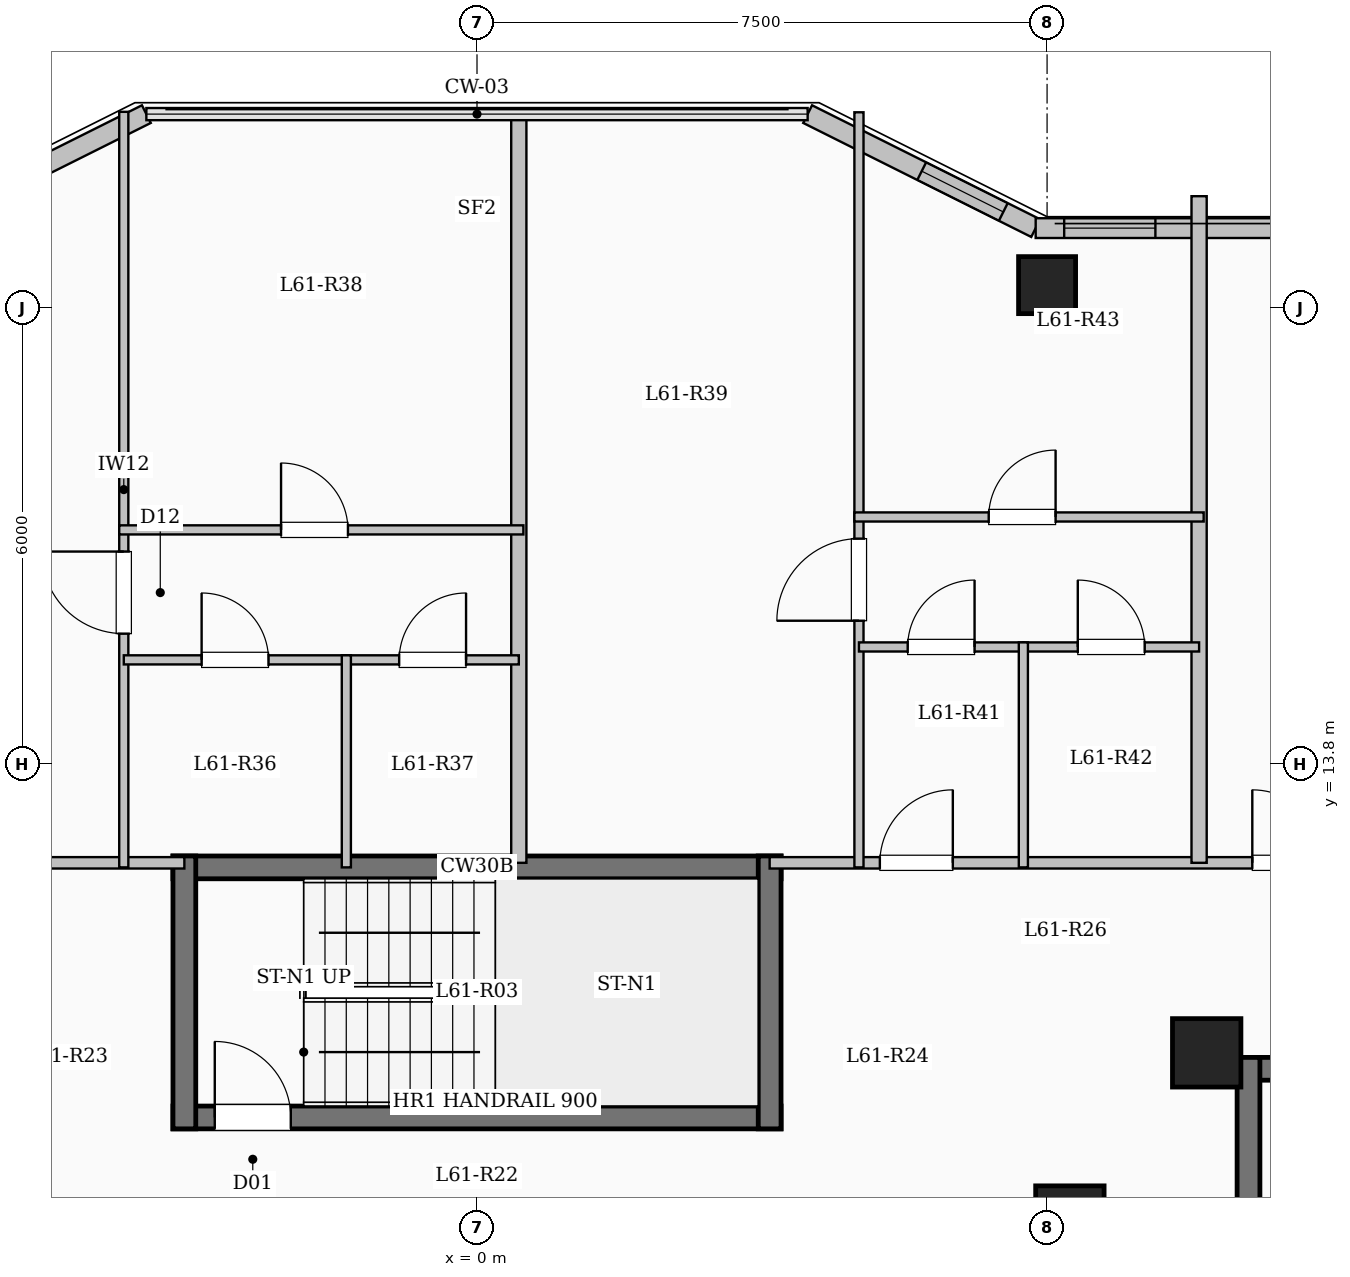
"""IFC4 building model, lengths in metres.
Left out: names, types, materials, properties, quantities, classifications, styles, units other than length and angle.
Written with IfcOpenShell. Run it as: python <this file> out.ifc"""

import sys

from ifc_helpers import new_model, si_unit, direction, frame, frame_2d, origin, origin_2d, place, context, subcontext, project, spatial, rectangle, extrude, element, fill, save


model = new_model("IFC4")
c1 = context("Model", 3, precision=1e-05, world=origin(), true_north=direction((0.0, 1.0)))
c2 = subcontext(c1, "Body", "Model", "MODEL_VIEW")
j1 = project(units=[si_unit("LENGTHUNIT", "METRE"), si_unit("PLANEANGLEUNIT", "RADIAN")], contexts=[c1])
p1 = place(None, origin())
s1 = spatial("IfcSite", under=j1, at=p1, CompositionType="ELEMENT")
p2 = place(p1, origin())
s2 = spatial("IfcBuilding", under=s1, at=p2, CompositionType="ELEMENT")
p3 = place(p2, frame((0.0, 0.0, 223.75)))
s3 = spatial("IfcBuildingStorey", under=s2, at=p3, CompositionType="ELEMENT", Elevation=223.75)
for number, where, z_axis, x_axis in (
    (1, (7.8, 7.8, 0.0), (0.0, 0.0, 1.0), (1.0, 0.0, 0.0)),
    (2, (9.6, 10.0, 0.0), (0.0, 0.0, 1.0), (1.0, 0.0, 0.0)),
):
    element("IfcColumn", number, at=place(p3, frame(where, z_axis=z_axis, x_axis=x_axis)), inside=s3, PredefinedType="COLUMN", context=c2, shape_type="SweptSolid", body=[
        extrude(rectangle(XDim=0.9, YDim=0.9, at=origin_2d()), origin(), (0.0, 0.0, 1.0), 3.35),
    ])
p4 = place(p3, frame((7.5, 20.1, 0.0), z_axis=(0.0, 0.0, 1.0), x_axis=(1.0, 0.0, 0.0)))
e3 = element("IfcColumn", 3, at=p4, inside=s3, PredefinedType="COLUMN", context=c2, shape_type="SweptSolid", body=[
    extrude(rectangle(XDim=0.75, YDim=0.75, at=origin_2d()), origin(), (0.0, 0.0, 1.0), 3.35),
])
p5 = place(p3, frame((-7.35, 20.85, 0.0), z_axis=(0.0, 0.0, 1.0), x_axis=(0.894427191, 0.4472135955, 0.0)))
e4 = element("IfcWall", 4, at=p5, inside=s3, PredefinedType="SOLIDWALL", context=c2, shape_type="SweptSolid", body=[
    extrude(rectangle(XDim=3.354, YDim=0.26, at=frame_2d((1.677, 0.0))), origin(), (0.0, 0.0, 1.0), 3.05),
])
p6 = place(p5, frame((0.501, 0.0, 0.95)))
e5 = element("IfcOpeningElement", 5, at=p6, cuts=e4, PredefinedType="OPENING", context=c2, shape_type="SweptSolid", body=[
    extrude(rectangle(XDim=1.2, YDim=1.5, at=frame_2d((0.6, 0.75))), frame((0.0, 0.14, 0.0), z_axis=(0.0, -1.0, 0.0), x_axis=(1.0, 0.0, 0.0)), (0.0, 0.0, 1.0), 0.28),
])
p7 = place(p3, frame((4.35, 22.35, 0.0), z_axis=(0.0, 0.0, 1.0), x_axis=(0.894427191, -0.4472135955, 0.0)))
e6 = element("IfcWall", 6, at=p7, inside=s3, PredefinedType="SOLIDWALL", context=c2, shape_type="SweptSolid", body=[
    extrude(rectangle(XDim=3.354, YDim=0.26, at=frame_2d((1.677, 0.0))), origin(), (0.0, 0.0, 1.0), 3.05),
])
p8 = place(p7, frame((1.678, 0.0, 0.95)))
e7 = element("IfcOpeningElement", 7, at=p8, cuts=e6, PredefinedType="OPENING", context=c2, shape_type="SweptSolid", body=[
    extrude(rectangle(XDim=1.2, YDim=1.5, at=frame_2d((0.6, 0.75))), frame((0.0, 0.14, 0.0), z_axis=(0.0, -1.0, 0.0), x_axis=(1.0, 0.0, 0.0)), (0.0, 0.0, 1.0), 0.28),
])
p9 = place(p3, frame((7.35, 20.85, 0.0), z_axis=(0.0, 0.0, 1.0), x_axis=(1.0, 0.0, 0.0)))
e8 = element("IfcWall", 8, at=p9, inside=s3, PredefinedType="SOLIDWALL", context=c2, shape_type="SweptSolid", body=[
    extrude(rectangle(XDim=11.1, YDim=0.26, at=frame_2d((5.55, 0.0))), origin(), (0.0, 0.0, 1.0), 3.05),
])
p10 = place(p9, frame((0.375, 0.0, 0.95)))
e9 = element("IfcOpeningElement", 9, at=p10, cuts=e8, PredefinedType="OPENING", context=c2, shape_type="SweptSolid", body=[
    extrude(rectangle(XDim=1.2, YDim=1.5, at=frame_2d((0.6, 0.75))), frame((0.0, 0.14, 0.0), z_axis=(0.0, -1.0, 0.0), x_axis=(1.0, 0.0, 0.0)), (0.0, 0.0, 1.0), 0.28),
])
p11 = place(p9, frame((3.245, 0.0, 0.9)))
e10 = element("IfcOpeningElement", 10, at=p11, cuts=e8, PredefinedType="OPENING", context=c2, shape_type="SweptSolid", body=[
    extrude(rectangle(XDim=2.2, YDim=1.75, at=frame_2d((1.1, 0.875))), frame((0.0, 0.14, 0.0), z_axis=(0.0, -1.0, 0.0), x_axis=(1.0, 0.0, 0.0)), (0.0, 0.0, 1.0), 0.28),
])
p12 = place(p9, frame((7.965, 0.0, 0.9)))
e11 = element("IfcOpeningElement", 11, at=p12, cuts=e8, PredefinedType="OPENING", context=c2, shape_type="SweptSolid", body=[
    extrude(rectangle(XDim=1.65, YDim=1.6, at=frame_2d((0.825, 0.8))), frame((0.0, 0.14, 0.0), z_axis=(0.0, -1.0, 0.0), x_axis=(1.0, 0.0, 0.0)), (0.0, 0.0, 1.0), 0.28),
])
p13 = place(p3, frame((10.0, 9.79, 0.0), z_axis=(0.0, 0.0, 1.0), x_axis=(1.0, 0.0, 0.0)))
e12 = element("IfcWall", 12, at=p13, inside=s3, PredefinedType="SHEAR", context=c2, shape_type="SweptSolid", body=[
    extrude(rectangle(XDim=8.0, YDim=0.3, at=frame_2d((4.0, 0.0))), origin(), (0.0, 0.0, 1.0), 3.35),
])
p14 = place(p3, frame((10.15, 6.35, 0.0), z_axis=(0.0, 0.0, 1.0), x_axis=(0.0, 1.0, 0.0)))
e13 = element("IfcWall", 13, at=p14, inside=s3, PredefinedType="SHEAR", context=c2, shape_type="SweptSolid", body=[
    extrude(rectangle(XDim=3.59, YDim=0.3, at=frame_2d((1.795, 0.0))), origin(), (0.0, 0.0, 1.0), 3.35),
])
p15 = place(p3, frame((-4.0, 12.44, 0.0), z_axis=(0.0, 0.0, 1.0), x_axis=(1.0, 0.0, 0.0)))
e14 = element("IfcWall", 14, at=p15, inside=s3, PredefinedType="SHEAR", context=c2, shape_type="SweptSolid", body=[
    extrude(rectangle(XDim=8.0, YDim=0.3, at=frame_2d((4.0, 0.0))), origin(), (0.0, 0.0, 1.0), 3.35),
])
p16 = place(p3, frame((-4.0, 9.15, 0.0), z_axis=(0.0, 0.0, 1.0), x_axis=(1.0, 0.0, 0.0)))
e15 = element("IfcWall", 15, at=p16, inside=s3, PredefinedType="SHEAR", context=c2, shape_type="SweptSolid", body=[
    extrude(rectangle(XDim=8.0, YDim=0.3, at=frame_2d((4.0, 0.0))), origin(), (0.0, 0.0, 1.0), 3.35),
])
p17 = place(p16, frame((0.55, 0.0, 0.0)))
e16 = element("IfcOpeningElement", 16, at=p17, cuts=e15, PredefinedType="OPENING", context=c2, shape_type="SweptSolid", body=[
    extrude(rectangle(XDim=1.0, YDim=2.15, at=frame_2d((0.5, 1.075))), frame((0.0, 0.16, 0.0), z_axis=(0.0, -1.0, 0.0), x_axis=(1.0, 0.0, 0.0)), (0.0, 0.0, 1.0), 0.32),
])
for number, where, z_axis, x_axis in (
    (17, (-3.85, 9.0, 0.0), (0.0, 0.0, 1.0), (0.0, 1.0, 0.0)),
    (18, (3.85, 9.0, 0.0), (0.0, 0.0, 1.0), (0.0, 1.0, 0.0)),
):
    element("IfcWall", number, at=place(p3, frame(where, z_axis=z_axis, x_axis=x_axis)), inside=s3, PredefinedType="SHEAR", context=c2, shape_type="SweptSolid", body=[
        extrude(rectangle(XDim=3.59, YDim=0.3, at=frame_2d((1.795, 0.0))), origin(), (0.0, 0.0, 1.0), 3.35),
    ])
p18 = place(p3, frame((-18.35, 12.5, 0.0), z_axis=(0.0, 0.0, 1.0), x_axis=(1.0, 0.0, 0.0)))
e19 = element("IfcWall", 19, at=p18, inside=s3, PredefinedType="PARTITIONING", context=c2, shape_type="SweptSolid", body=[
    extrude(rectangle(XDim=14.5, YDim=0.15, at=frame_2d((7.25, 0.0))), origin(), (0.0, 0.0, 1.0), 3.05),
])
p19 = place(p18, frame((0.7, 0.0, 0.0)))
e20 = element("IfcOpeningElement", 20, at=p19, cuts=e19, PredefinedType="OPENING", context=c2, shape_type="SweptSolid", body=[
    extrude(rectangle(XDim=0.96, YDim=2.15, at=frame_2d((0.48, 1.075))), frame((0.0, 0.085, 0.0), z_axis=(0.0, -1.0, 0.0), x_axis=(1.0, 0.0, 0.0)), (0.0, 0.0, 1.0), 0.17),
])
p20 = place(p18, frame((9.205, 0.0, 0.0)))
e21 = element("IfcOpeningElement", 21, at=p20, cuts=e19, PredefinedType="OPENING", context=c2, shape_type="SweptSolid", body=[
    extrude(rectangle(XDim=0.96, YDim=2.15, at=frame_2d((0.48, 1.075))), frame((0.0, 0.085, 0.0), z_axis=(0.0, -1.0, 0.0), x_axis=(1.0, 0.0, 0.0)), (0.0, 0.0, 1.0), 0.17),
])
p21 = place(p3, frame((3.85, 12.5, 0.0), z_axis=(0.0, 0.0, 1.0), x_axis=(1.0, 0.0, 0.0)))
e22 = element("IfcWall", 22, at=p21, inside=s3, PredefinedType="PARTITIONING", context=c2, shape_type="SweptSolid", body=[
    extrude(rectangle(XDim=14.5, YDim=0.15, at=frame_2d((7.25, 0.0))), origin(), (0.0, 0.0, 1.0), 3.05),
])
p22 = place(p21, frame((1.45, 0.0, 0.0)))
e23 = element("IfcOpeningElement", 23, at=p22, cuts=e22, PredefinedType="OPENING", context=c2, shape_type="SweptSolid", body=[
    extrude(rectangle(XDim=0.96, YDim=2.15, at=frame_2d((0.48, 1.075))), frame((0.0, 0.085, 0.0), z_axis=(0.0, -1.0, 0.0), x_axis=(1.0, 0.0, 0.0)), (0.0, 0.0, 1.0), 0.17),
])
p23 = place(p21, frame((6.35, 0.0, 0.0)))
e24 = element("IfcOpeningElement", 24, at=p23, cuts=e22, PredefinedType="OPENING", context=c2, shape_type="SweptSolid", body=[
    extrude(rectangle(XDim=0.96, YDim=2.15, at=frame_2d((0.48, 1.075))), frame((0.0, 0.085, 0.0), z_axis=(0.0, -1.0, 0.0), x_axis=(1.0, 0.0, 0.0)), (0.0, 0.0, 1.0), 0.17),
])
p24 = place(p3, frame((0.55, 12.5, 0.0), z_axis=(0.0, 0.0, 1.0), x_axis=(0.0, 1.0, 0.0)))
e25 = element("IfcWall", 25, at=p24, inside=s3, PredefinedType="SOLIDWALL", context=c2, shape_type="SweptSolid", body=[
    extrude(rectangle(XDim=9.88, YDim=0.2, at=frame_2d((4.94, 0.0))), origin(), (0.0, 0.0, 1.0), 3.05),
])
p25 = place(p3, frame((-4.647, 12.44, 0.0), z_axis=(0.0, 0.0, 1.0), x_axis=(0.0, 1.0, 0.0)))
e26 = element("IfcWall", 26, at=p25, inside=s3, PredefinedType="PARTITIONING", context=c2, shape_type="SweptSolid", body=[
    extrude(rectangle(XDim=9.94, YDim=0.12, at=frame_2d((4.97, 0.0))), origin(), (0.0, 0.0, 1.0), 3.05),
])
p26 = place(p25, frame((3.075, 0.0, 0.0)))
e27 = element("IfcOpeningElement", 27, at=p26, cuts=e26, PredefinedType="OPENING", context=c2, shape_type="SweptSolid", body=[
    extrude(rectangle(XDim=1.08, YDim=2.15, at=frame_2d((0.54, 1.075))), frame((0.0, 0.07, 0.0), z_axis=(0.0, -1.0, 0.0), x_axis=(1.0, 0.0, 0.0)), (0.0, 0.0, 1.0), 0.14),
])
p27 = place(p3, frame((-4.647, 15.17, 0.0), z_axis=(0.0, 0.0, 1.0), x_axis=(1.0, 0.0, 0.0)))
e28 = element("IfcWall", 28, at=p27, inside=s3, PredefinedType="PARTITIONING", context=c2, shape_type="SweptSolid", body=[
    extrude(rectangle(XDim=2.928, YDim=0.12, at=frame_2d((1.464, 0.0))), origin(), (0.0, 0.0, 1.0), 3.05),
])
p28 = place(p27, frame((1.024, 0.0, 0.0)))
e29 = element("IfcOpeningElement", 29, at=p28, cuts=e28, PredefinedType="OPENING", context=c2, shape_type="SweptSolid", body=[
    extrude(rectangle(XDim=0.88, YDim=2.1, at=frame_2d((0.44, 1.05))), frame((0.0, 0.07, 0.0), z_axis=(0.0, -1.0, 0.0), x_axis=(1.0, 0.0, 0.0)), (0.0, 0.0, 1.0), 0.14),
])
p29 = place(p3, frame((-1.719, 15.17, 0.0), z_axis=(0.0, 0.0, 1.0), x_axis=(1.0, 0.0, 0.0)))
e30 = element("IfcWall", 30, at=p29, inside=s3, PredefinedType="PARTITIONING", context=c2, shape_type="SweptSolid", body=[
    extrude(rectangle(XDim=2.269, YDim=0.12, at=frame_2d((1.135, 0.0))), origin(), (0.0, 0.0, 1.0), 3.05),
])
p30 = place(p29, frame((0.695, 0.0, 0.0)))
e31 = element("IfcOpeningElement", 31, at=p30, cuts=e30, PredefinedType="OPENING", context=c2, shape_type="SweptSolid", body=[
    extrude(rectangle(XDim=0.88, YDim=2.1, at=frame_2d((0.44, 1.05))), frame((0.0, 0.07, 0.0), z_axis=(0.0, -1.0, 0.0), x_axis=(1.0, 0.0, 0.0)), (0.0, 0.0, 1.0), 0.14),
])
p31 = place(p3, frame((-4.707, 16.88, 0.0), z_axis=(0.0, 0.0, 1.0), x_axis=(1.0, 0.0, 0.0)))
e32 = element("IfcWall", 32, at=p31, inside=s3, PredefinedType="PARTITIONING", context=c2, shape_type="SweptSolid", body=[
    extrude(rectangle(XDim=5.317, YDim=0.12, at=frame_2d((2.659, 0.0))), origin(), (0.0, 0.0, 1.0), 2.675),
])
p32 = place(p31, frame((2.129, 0.0, 0.0)))
e33 = element("IfcOpeningElement", 33, at=p32, cuts=e32, PredefinedType="OPENING", context=c2, shape_type="SweptSolid", body=[
    extrude(rectangle(XDim=0.88, YDim=2.1, at=frame_2d((0.44, 1.05))), frame((0.0, 0.07, 0.0), z_axis=(0.0, -1.0, 0.0), x_axis=(1.0, 0.0, 0.0)), (0.0, 0.0, 1.0), 0.14),
])
p33 = place(p3, frame((-1.719, 12.44, 0.0), z_axis=(0.0, 0.0, 1.0), x_axis=(0.0, 1.0, 0.0)))
e34 = element("IfcWall", 34, at=p33, inside=s3, PredefinedType="PARTITIONING", context=c2, shape_type="SweptSolid", body=[
    extrude(rectangle(XDim=2.79, YDim=0.12, at=frame_2d((1.395, 0.0))), origin(), (0.0, 0.0, 1.0), 3.05),
])
p34 = place(p3, frame((9.5, 12.5, 0.0), z_axis=(0.0, 0.0, 1.0), x_axis=(0.0, 1.0, 0.0)))
e35 = element("IfcWall", 35, at=p34, inside=s3, PredefinedType="SOLIDWALL", context=c2, shape_type="SweptSolid", body=[
    extrude(rectangle(XDim=8.77, YDim=0.2, at=frame_2d((4.385, 0.0))), origin(), (0.0, 0.0, 1.0), 3.05),
])
p35 = place(p3, frame((5.025, 12.44, 0.0), z_axis=(0.0, 0.0, 1.0), x_axis=(0.0, 1.0, 0.0)))
e36 = element("IfcWall", 36, at=p35, inside=s3, PredefinedType="PARTITIONING", context=c2, shape_type="SweptSolid", body=[
    extrude(rectangle(XDim=9.934, YDim=0.12, at=frame_2d((4.967, 0.0))), origin(), (0.0, 0.0, 1.0), 3.05),
])
p36 = place(p35, frame((3.245, 0.0, 0.0)))
e37 = element("IfcOpeningElement", 37, at=p36, cuts=e36, PredefinedType="OPENING", context=c2, shape_type="SweptSolid", body=[
    extrude(rectangle(XDim=1.08, YDim=2.15, at=frame_2d((0.54, 1.075))), frame((0.0, 0.07, 0.0), z_axis=(0.0, -1.0, 0.0), x_axis=(1.0, 0.0, 0.0)), (0.0, 0.0, 1.0), 0.14),
])
p37 = place(p3, frame((5.025, 15.34, 0.0), z_axis=(0.0, 0.0, 1.0), x_axis=(1.0, 0.0, 0.0)))
e38 = element("IfcWall", 38, at=p37, inside=s3, PredefinedType="PARTITIONING", context=c2, shape_type="SweptSolid", body=[
    extrude(rectangle(XDim=2.163, YDim=0.12, at=frame_2d((1.082, 0.0))), origin(), (0.0, 0.0, 1.0), 2.675),
])
p38 = place(p37, frame((0.641, 0.0, 0.0)))
e39 = element("IfcOpeningElement", 39, at=p38, cuts=e38, PredefinedType="OPENING", context=c2, shape_type="SweptSolid", body=[
    extrude(rectangle(XDim=0.88, YDim=2.1, at=frame_2d((0.44, 1.05))), frame((0.0, 0.07, 0.0), z_axis=(0.0, -1.0, 0.0), x_axis=(1.0, 0.0, 0.0)), (0.0, 0.0, 1.0), 0.14),
])
p39 = place(p3, frame((7.188, 15.34, 0.0), z_axis=(0.0, 0.0, 1.0), x_axis=(1.0, 0.0, 0.0)))
e40 = element("IfcWall", 40, at=p39, inside=s3, PredefinedType="PARTITIONING", context=c2, shape_type="SweptSolid", body=[
    extrude(rectangle(XDim=2.312, YDim=0.12, at=frame_2d((1.156, 0.0))), origin(), (0.0, 0.0, 1.0), 2.675),
])
p40 = place(p39, frame((0.716, 0.0, 0.0)))
e41 = element("IfcOpeningElement", 41, at=p40, cuts=e40, PredefinedType="OPENING", context=c2, shape_type="SweptSolid", body=[
    extrude(rectangle(XDim=0.88, YDim=2.1, at=frame_2d((0.44, 1.05))), frame((0.0, 0.07, 0.0), z_axis=(0.0, -1.0, 0.0), x_axis=(1.0, 0.0, 0.0)), (0.0, 0.0, 1.0), 0.14),
])
p41 = place(p3, frame((4.965, 17.05, 0.0), z_axis=(0.0, 0.0, 1.0), x_axis=(1.0, 0.0, 0.0)))
e42 = element("IfcWall", 42, at=p41, inside=s3, PredefinedType="PARTITIONING", context=c2, shape_type="SweptSolid", body=[
    extrude(rectangle(XDim=4.595, YDim=0.12, at=frame_2d((2.297, 0.0))), origin(), (0.0, 0.0, 1.0), 2.675),
])
p42 = place(p41, frame((1.767, 0.0, 0.0)))
e43 = element("IfcOpeningElement", 43, at=p42, cuts=e42, PredefinedType="OPENING", context=c2, shape_type="SweptSolid", body=[
    extrude(rectangle(XDim=0.88, YDim=2.1, at=frame_2d((0.44, 1.05))), frame((0.0, 0.07, 0.0), z_axis=(0.0, -1.0, 0.0), x_axis=(1.0, 0.0, 0.0)), (0.0, 0.0, 1.0), 0.14),
])
p43 = place(p3, frame((7.188, 12.44, 0.0), z_axis=(0.0, 0.0, 1.0), x_axis=(0.0, 1.0, 0.0)))
e44 = element("IfcWall", 44, at=p43, inside=s3, PredefinedType="PARTITIONING", context=c2, shape_type="SweptSolid", body=[
    extrude(rectangle(XDim=2.96, YDim=0.12, at=frame_2d((1.48, 0.0))), origin(), (0.0, 0.0, 1.0), 2.535),
])
p44 = place(p8, origin())
e45 = element("IfcWindow", 45, at=p44, inside=s3, PartitioningType="SINGLE_PANEL", PredefinedType="WINDOW", context=c2, shape_type="SweptSolid", body=[
    extrude(rectangle(XDim=1.2, YDim=1.5, at=frame_2d((0.6, 0.75))), frame((0.0, 0.03, 0.0), z_axis=(0.0, -1.0, 0.0), x_axis=(1.0, 0.0, 0.0)), (0.0, 0.0, 1.0), 0.06),
])
fill(e7, e45)
p45 = place(p10, origin())
e46 = element("IfcWindow", 46, at=p45, inside=s3, PartitioningType="SINGLE_PANEL", PredefinedType="WINDOW", context=c2, shape_type="SweptSolid", body=[
    extrude(rectangle(XDim=1.2, YDim=1.5, at=frame_2d((0.6, 0.75))), frame((0.0, 0.03, 0.0), z_axis=(0.0, -1.0, 0.0), x_axis=(1.0, 0.0, 0.0)), (0.0, 0.0, 1.0), 0.06),
])
fill(e9, e46)
p46 = place(p17, origin())
e47 = element("IfcDoor", 47, at=p46, inside=s3, OperationType="SINGLE_SWING_LEFT", PredefinedType="DOOR", context=c2, shape_type="SweptSolid", body=[
    extrude(rectangle(XDim=1.0, YDim=2.15, at=frame_2d((0.5, 1.075))), frame((0.0, 0.025, 0.0), z_axis=(0.0, -1.0, 0.0), x_axis=(1.0, 0.0, 0.0)), (0.0, 0.0, 1.0), 0.05),
])
fill(e16, e47)
p47 = place(p26, origin())
e48 = element("IfcDoor", 48, at=p47, inside=s3, OperationType="SINGLE_SWING_RIGHT", PredefinedType="DOOR", context=c2, shape_type="SweptSolid", body=[
    extrude(rectangle(XDim=1.08, YDim=2.15, at=frame_2d((0.54, 1.075))), frame((0.0, 0.025, 0.0), z_axis=(0.0, -1.0, 0.0), x_axis=(1.0, 0.0, 0.0)), (0.0, 0.0, 1.0), 0.05),
])
fill(e27, e48)
p48 = place(p28, origin())
e49 = element("IfcDoor", 49, at=p48, inside=s3, OperationType="SINGLE_SWING_LEFT", PredefinedType="DOOR", context=c2, shape_type="SweptSolid", body=[
    extrude(rectangle(XDim=0.88, YDim=2.1, at=frame_2d((0.44, 1.05))), frame((0.0, 0.025, 0.0), z_axis=(0.0, -1.0, 0.0), x_axis=(1.0, 0.0, 0.0)), (0.0, 0.0, 1.0), 0.05),
])
fill(e29, e49)
p49 = place(p30, origin())
e50 = element("IfcDoor", 50, at=p49, inside=s3, OperationType="SINGLE_SWING_RIGHT", PredefinedType="DOOR", context=c2, shape_type="SweptSolid", body=[
    extrude(rectangle(XDim=0.88, YDim=2.1, at=frame_2d((0.44, 1.05))), frame((0.0, 0.025, 0.0), z_axis=(0.0, -1.0, 0.0), x_axis=(1.0, 0.0, 0.0)), (0.0, 0.0, 1.0), 0.05),
])
fill(e31, e50)
p50 = place(p32, origin())
e51 = element("IfcDoor", 51, at=p50, inside=s3, OperationType="SINGLE_SWING_LEFT", PredefinedType="DOOR", context=c2, shape_type="SweptSolid", body=[
    extrude(rectangle(XDim=0.88, YDim=2.1, at=frame_2d((0.44, 1.05))), frame((0.0, 0.025, 0.0), z_axis=(0.0, -1.0, 0.0), x_axis=(1.0, 0.0, 0.0)), (0.0, 0.0, 1.0), 0.05),
])
fill(e33, e51)
p51 = place(p22, origin())
e52 = element("IfcDoor", 52, at=p51, inside=s3, OperationType="SINGLE_SWING_RIGHT", PredefinedType="DOOR", context=c2, shape_type="SweptSolid", body=[
    extrude(rectangle(XDim=0.96, YDim=2.15, at=frame_2d((0.48, 1.075))), frame((0.0, 0.025, 0.0), z_axis=(0.0, -1.0, 0.0), x_axis=(1.0, 0.0, 0.0)), (0.0, 0.0, 1.0), 0.05),
])
fill(e23, e52)
p52 = place(p36, origin())
e53 = element("IfcDoor", 53, at=p52, inside=s3, OperationType="SINGLE_SWING_LEFT", PredefinedType="DOOR", context=c2, shape_type="SweptSolid", body=[
    extrude(rectangle(XDim=1.08, YDim=2.15, at=frame_2d((0.54, 1.075))), frame((0.0, 0.025, 0.0), z_axis=(0.0, -1.0, 0.0), x_axis=(1.0, 0.0, 0.0)), (0.0, 0.0, 1.0), 0.05),
])
fill(e37, e53)
p53 = place(p38, origin())
e54 = element("IfcDoor", 54, at=p53, inside=s3, OperationType="SINGLE_SWING_RIGHT", PredefinedType="DOOR", context=c2, shape_type="SweptSolid", body=[
    extrude(rectangle(XDim=0.88, YDim=2.1, at=frame_2d((0.44, 1.05))), frame((0.0, 0.025, 0.0), z_axis=(0.0, -1.0, 0.0), x_axis=(1.0, 0.0, 0.0)), (0.0, 0.0, 1.0), 0.05),
])
fill(e39, e54)
p54 = place(p40, origin())
e55 = element("IfcDoor", 55, at=p54, inside=s3, OperationType="SINGLE_SWING_LEFT", PredefinedType="DOOR", context=c2, shape_type="SweptSolid", body=[
    extrude(rectangle(XDim=0.88, YDim=2.1, at=frame_2d((0.44, 1.05))), frame((0.0, 0.025, 0.0), z_axis=(0.0, -1.0, 0.0), x_axis=(1.0, 0.0, 0.0)), (0.0, 0.0, 1.0), 0.05),
])
fill(e41, e55)
p55 = place(p42, origin())
e56 = element("IfcDoor", 56, at=p55, inside=s3, OperationType="SINGLE_SWING_RIGHT", PredefinedType="DOOR", context=c2, shape_type="SweptSolid", body=[
    extrude(rectangle(XDim=0.88, YDim=2.1, at=frame_2d((0.44, 1.05))), frame((0.0, 0.025, 0.0), z_axis=(0.0, -1.0, 0.0), x_axis=(1.0, 0.0, 0.0)), (0.0, 0.0, 1.0), 0.05),
])
fill(e43, e56)
p56 = place(p23, origin())
e57 = element("IfcDoor", 57, at=p56, inside=s3, OperationType="SINGLE_SWING_LEFT", PredefinedType="DOOR", context=c2, shape_type="SweptSolid", body=[
    extrude(rectangle(XDim=0.96, YDim=2.15, at=frame_2d((0.48, 1.075))), frame((0.0, 0.025, 0.0), z_axis=(0.0, -1.0, 0.0), x_axis=(1.0, 0.0, 0.0)), (0.0, 0.0, 1.0), 0.05),
])
fill(e24, e57)
save(model, sys.argv[1])
